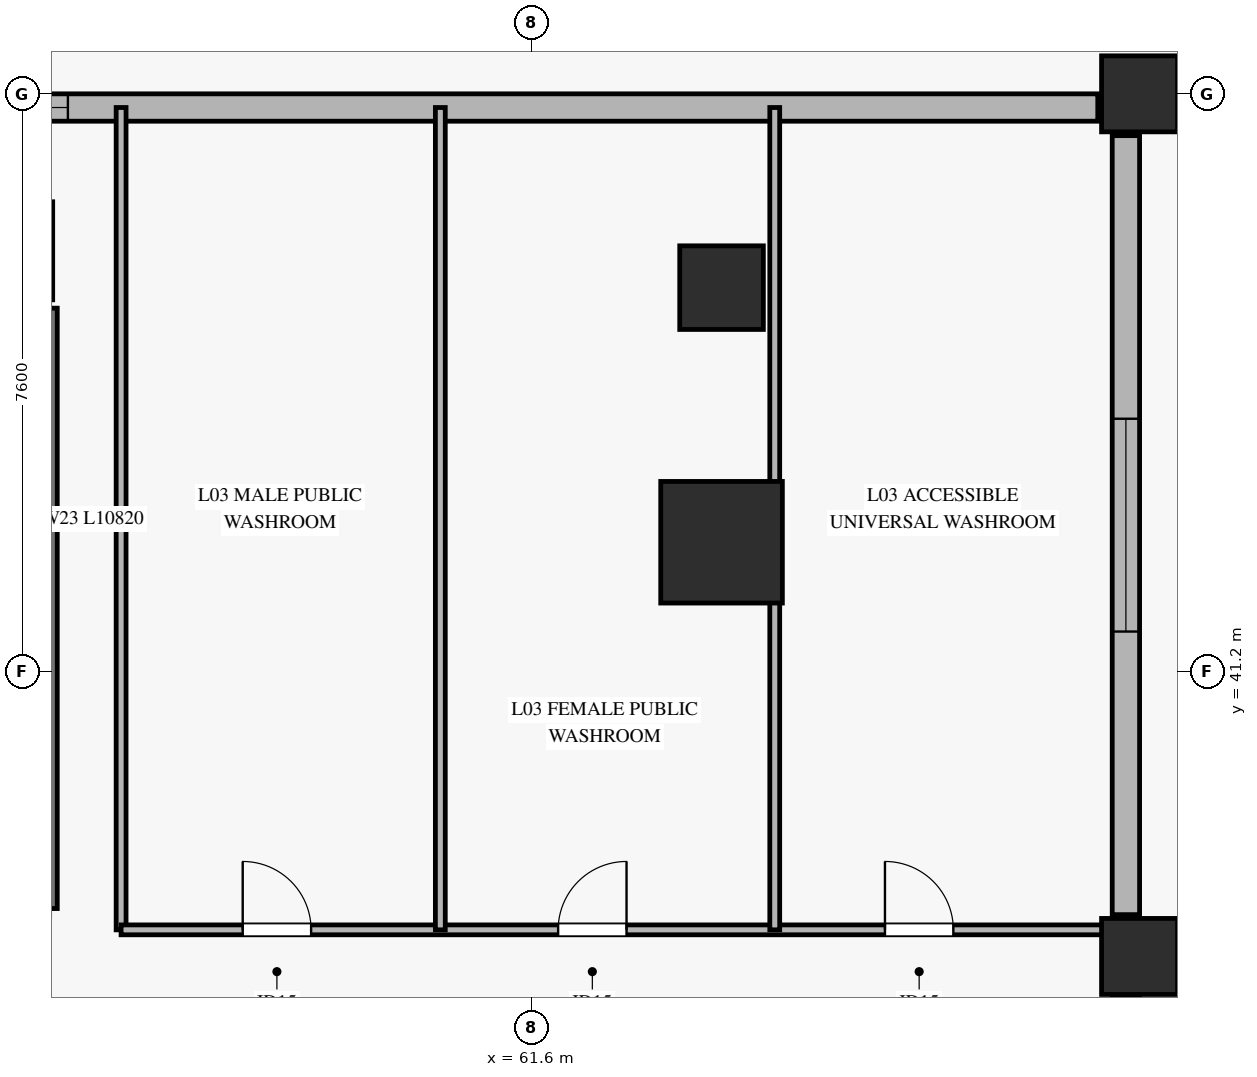
"""IFC4 building model, lengths in metres.
Left out: names, types, materials, properties, quantities, classifications, styles, units other than length and angle.
Written with IfcOpenShell. Run it as: python <this file> out.ifc"""

import sys

from ifc_helpers import new_model, si_unit, direction, frame, frame_2d, origin, origin_2d, place, context, subcontext, project, spatial, rectangle, hollow_rectangle, extrude, source, transform, mapped, element, fill, save


model = new_model("IFC4")
c1 = context("Model", 3, precision=1e-05, world=origin(), true_north=direction((0.0, 1.0)))
c2 = subcontext(c1, "Body", "Model", "MODEL_VIEW")
j1 = project(units=[si_unit("LENGTHUNIT", "METRE"), si_unit("PLANEANGLEUNIT", "RADIAN")], contexts=[c1])
p1 = place(None, origin())
s1 = spatial("IfcSite", under=j1, at=p1, CompositionType="ELEMENT")
p2 = place(p1, origin())
s2 = spatial("IfcBuilding", under=s1, at=p2, CompositionType="ELEMENT")
p3 = place(p2, frame((0.0, 0.0, 10.4)))
s3 = spatial("IfcBuildingStorey", under=s2, at=p3, CompositionType="ELEMENT", Elevation=10.4)
m1 = source(origin(), c2, "Body", "SweptSolid", [
    extrude(hollow_rectangle(XDim=1.6, YDim=1.6, WallThickness=0.075, at=origin_2d()), origin(), (0.0, 0.0, 1.0), 4.54),
])
p4 = place(p3, frame((64.1, 42.9, 0.0), z_axis=(0.0, 0.0, 1.0), x_axis=(1.0, 0.0, 0.0)))
e1 = element("IfcColumn", 1, at=p4, inside=s3, PredefinedType="COLUMN", context=c2, shape_type="MappedRepresentation", body=[
    mapped(m1, transform((0.0, 0.0, 0.0), x_axis=(1.0, 0.0, 0.0), y_axis=(0.0, 1.0, 0.0), z_axis=(0.0, 0.0, 1.0), scale=1.0)),
])
m2 = source(origin(), c2, "Body", "SweptSolid", [
    extrude(hollow_rectangle(XDim=1.1, YDim=1.1, WallThickness=0.05, at=origin_2d()), origin(), (0.0, 0.0, 1.0), 4.54),
])
p5 = place(p3, frame((64.1, 46.25, 0.0), z_axis=(0.0, 0.0, 1.0), x_axis=(1.0, 0.0, 0.0)))
e2 = element("IfcColumn", 2, at=p5, inside=s3, PredefinedType="COLUMN", context=c2, shape_type="MappedRepresentation", body=[
    mapped(m2, transform((0.0, 0.0, 0.0), x_axis=(1.0, 0.0, 0.0), y_axis=(0.0, 1.0, 0.0), z_axis=(0.0, 0.0, 1.0), scale=1.0)),
])
m3 = source(origin(), c2, "Body", "SweptSolid", [
    extrude(hollow_rectangle(XDim=1.0, YDim=1.0, WallThickness=0.045, at=origin_2d()), origin(), (0.0, 0.0, 1.0), 4.54),
])
for number, where, z_axis, x_axis in (
    (3, (69.6, 37.45, 0.0), (0.0, 0.0, 1.0), (1.0, 0.0, 0.0)),
    (4, (69.6, 48.8, 0.0), (0.0, 0.0, 1.0), (1.0, 0.0, 0.0)),
):
    element("IfcColumn", number, at=place(p3, frame(where, z_axis=z_axis, x_axis=x_axis)), inside=s3, PredefinedType="COLUMN", context=c2, shape_type="MappedRepresentation", body=[
        mapped(m3, transform((0.0, 0.0, 0.0), x_axis=(1.0, 0.0, 0.0), y_axis=(0.0, 1.0, 0.0), z_axis=(0.0, 0.0, 1.0), scale=1.0)),
    ])
p6 = place(p3, frame((51.1, 48.62, 0.0), z_axis=(0.0, 0.0, 1.0), x_axis=(1.0, 0.0, 0.0)))
e5 = element("IfcWall", 5, at=p6, inside=s3, PredefinedType="SOLIDWALL", context=c2, shape_type="SweptSolid", body=[
    extrude(rectangle(XDim=17.95, YDim=0.36, at=frame_2d((8.975, 0.0))), origin(), (0.0, 0.0, 1.0), 3.42),
])
p7 = place(p6, frame((1.6, 0.0, 0.72)))
e6 = element("IfcOpeningElement", 6, at=p7, cuts=e5, PredefinedType="OPENING", context=c2, shape_type="SweptSolid", body=[
    extrude(rectangle(XDim=2.8, YDim=2.0, at=frame_2d((1.4, 1.0))), frame((0.0, 0.19, 0.0), z_axis=(0.0, -1.0, 0.0), x_axis=(1.0, 0.0, 0.0)), (0.0, 0.0, 1.0), 0.38),
])
p8 = place(p3, frame((69.42, 38.0, 0.0), z_axis=(0.0, 0.0, 1.0), x_axis=(0.0, 1.0, 0.0)))
e7 = element("IfcWall", 7, at=p8, inside=s3, PredefinedType="SOLIDWALL", context=c2, shape_type="SweptSolid", body=[
    extrude(rectangle(XDim=10.25, YDim=0.36, at=frame_2d((5.125, 0.0))), origin(), (0.0, 0.0, 1.0), 3.42),
])
p9 = place(p8, frame((3.725, 0.0, 0.72)))
e8 = element("IfcOpeningElement", 8, at=p9, cuts=e7, PredefinedType="OPENING", context=c2, shape_type="SweptSolid", body=[
    extrude(rectangle(XDim=2.8, YDim=2.0, at=frame_2d((1.4, 1.0))), frame((0.0, 0.19, 0.0), z_axis=(0.0, -1.0, 0.0), x_axis=(1.0, 0.0, 0.0)), (0.0, 0.0, 1.0), 0.38),
])
p10 = place(p3, frame((55.26, 38.08, 0.0), z_axis=(0.0, 0.0, 1.0), x_axis=(0.0, 1.0, 0.0)))
e9 = element("IfcWall", 9, at=p10, inside=s3, PredefinedType="SOLIDWALL", context=c2, shape_type="SweptSolid", body=[
    extrude(rectangle(XDim=7.9, YDim=0.2, at=frame_2d((3.95, 0.0))), origin(), (0.0, 0.0, 1.0), 4.8),
])
p11 = place(p3, frame((56.2, 37.8, 0.0), z_axis=(0.0, 0.0, 1.0), x_axis=(0.0, 1.0, 0.0)))
e10 = element("IfcWall", 10, at=p11, inside=s3, PredefinedType="PARTITIONING", context=c2, shape_type="SweptSolid", body=[
    extrude(rectangle(XDim=10.82, YDim=0.13, at=frame_2d((5.41, 0.0))), origin(), (0.0, 0.0, 1.0), 4.54),
])
p12 = place(p3, frame((56.2, 37.8, 0.0), z_axis=(0.0, 0.0, 1.0), x_axis=(1.0, 0.0, 0.0)))
e11 = element("IfcWall", 11, at=p12, inside=s3, PredefinedType="PARTITIONING", context=c2, shape_type="SweptSolid", body=[
    extrude(rectangle(XDim=13.22, YDim=0.13, at=frame_2d((6.61, 0.0))), origin(), (0.0, 0.0, 1.0), 3.425),
])
p13 = place(p12, frame((1.6, 0.0, 0.0)))
e12 = element("IfcOpeningElement", 12, at=p13, cuts=e11, PredefinedType="OPENING", context=c2, shape_type="SweptSolid", body=[
    extrude(rectangle(XDim=0.9, YDim=2.1, at=frame_2d((0.45, 1.05))), frame((0.0, 0.075, 0.0), z_axis=(0.0, -1.0, 0.0), x_axis=(1.0, 0.0, 0.0)), (0.0, 0.0, 1.0), 0.15),
])
p14 = place(p12, frame((5.75, 0.0, 0.0)))
e13 = element("IfcOpeningElement", 13, at=p14, cuts=e11, PredefinedType="OPENING", context=c2, shape_type="SweptSolid", body=[
    extrude(rectangle(XDim=0.9, YDim=2.1, at=frame_2d((0.45, 1.05))), frame((0.0, 0.075, 0.0), z_axis=(0.0, -1.0, 0.0), x_axis=(1.0, 0.0, 0.0)), (0.0, 0.0, 1.0), 0.15),
])
p15 = place(p12, frame((10.05, 0.0, 0.0)))
e14 = element("IfcOpeningElement", 14, at=p15, cuts=e11, PredefinedType="OPENING", context=c2, shape_type="SweptSolid", body=[
    extrude(rectangle(XDim=0.9, YDim=2.1, at=frame_2d((0.45, 1.05))), frame((0.0, 0.075, 0.0), z_axis=(0.0, -1.0, 0.0), x_axis=(1.0, 0.0, 0.0)), (0.0, 0.0, 1.0), 0.15),
])
p16 = place(p3, frame((60.4, 37.8, 0.0), z_axis=(0.0, 0.0, 1.0), x_axis=(0.0, 1.0, 0.0)))
e15 = element("IfcWall", 15, at=p16, inside=s3, PredefinedType="PARTITIONING", context=c2, shape_type="SweptSolid", body=[
    extrude(rectangle(XDim=10.82, YDim=0.13, at=frame_2d((5.41, 0.0))), origin(), (0.0, 0.0, 1.0), 4.54),
])
p17 = place(p3, frame((64.8, 37.8, 0.0), z_axis=(0.0, 0.0, 1.0), x_axis=(0.0, 1.0, 0.0)))
e16 = element("IfcWall", 16, at=p17, inside=s3, PredefinedType="PARTITIONING", context=c2, shape_type="SweptSolid", body=[
    extrude(rectangle(XDim=10.82, YDim=0.13, at=frame_2d((5.41, 0.0))), origin(), (0.0, 0.0, 1.0), 3.425),
])
m4 = source(origin(), c2, "Body", "SweptSolid", [
    extrude(rectangle(XDim=2.8, YDim=2.0, at=frame_2d((1.4, 1.0))), frame((0.0, 0.03, 0.0), z_axis=(0.0, -1.0, 0.0), x_axis=(1.0, 0.0, 0.0)), (0.0, 0.0, 1.0), 0.06),
])
p18 = place(p7, origin())
e17 = element("IfcWindow", 17, at=p18, inside=s3, PartitioningType="SINGLE_PANEL", PredefinedType="WINDOW", context=c2, shape_type="MappedRepresentation", body=[
    mapped(m4, transform((0.0, 0.0, 0.0), x_axis=(1.0, 0.0, 0.0), y_axis=(0.0, 1.0, 0.0), z_axis=(0.0, 0.0, 1.0), scale=1.0)),
])
fill(e6, e17)
p19 = place(p9, origin())
e18 = element("IfcWindow", 18, at=p19, inside=s3, PartitioningType="SINGLE_PANEL", PredefinedType="WINDOW", context=c2, shape_type="MappedRepresentation", body=[
    mapped(m4, transform((0.0, 0.0, 0.0), x_axis=(1.0, 0.0, 0.0), y_axis=(0.0, 1.0, 0.0), z_axis=(0.0, 0.0, 1.0), scale=1.0)),
])
fill(e8, e18)
m5 = source(origin(), c2, "Body", "SweptSolid", [
    extrude(rectangle(XDim=0.9, YDim=2.1, at=frame_2d((0.45, 1.05))), frame((0.0, 0.025, 0.0), z_axis=(0.0, -1.0, 0.0), x_axis=(1.0, 0.0, 0.0)), (0.0, 0.0, 1.0), 0.05),
])
p20 = place(p13, origin())
e19 = element("IfcDoor", 19, at=p20, inside=s3, OperationType="SINGLE_SWING_LEFT", PredefinedType="DOOR", context=c2, shape_type="MappedRepresentation", body=[
    mapped(m5, transform((0.0, 0.0, 0.0), x_axis=(1.0, 0.0, 0.0), y_axis=(0.0, 1.0, 0.0), z_axis=(0.0, 0.0, 1.0), scale=1.0)),
])
fill(e12, e19)
p21 = place(p14, origin())
e20 = element("IfcDoor", 20, at=p21, inside=s3, OperationType="SINGLE_SWING_RIGHT", PredefinedType="DOOR", context=c2, shape_type="MappedRepresentation", body=[
    mapped(m5, transform((0.0, 0.0, 0.0), x_axis=(1.0, 0.0, 0.0), y_axis=(0.0, 1.0, 0.0), z_axis=(0.0, 0.0, 1.0), scale=1.0)),
])
fill(e13, e20)
p22 = place(p15, origin())
e21 = element("IfcDoor", 21, at=p22, inside=s3, OperationType="SINGLE_SWING_LEFT", PredefinedType="DOOR", context=c2, shape_type="MappedRepresentation", body=[
    mapped(m5, transform((0.0, 0.0, 0.0), x_axis=(1.0, 0.0, 0.0), y_axis=(0.0, 1.0, 0.0), z_axis=(0.0, 0.0, 1.0), scale=1.0)),
])
fill(e14, e21)
save(model, sys.argv[1])
